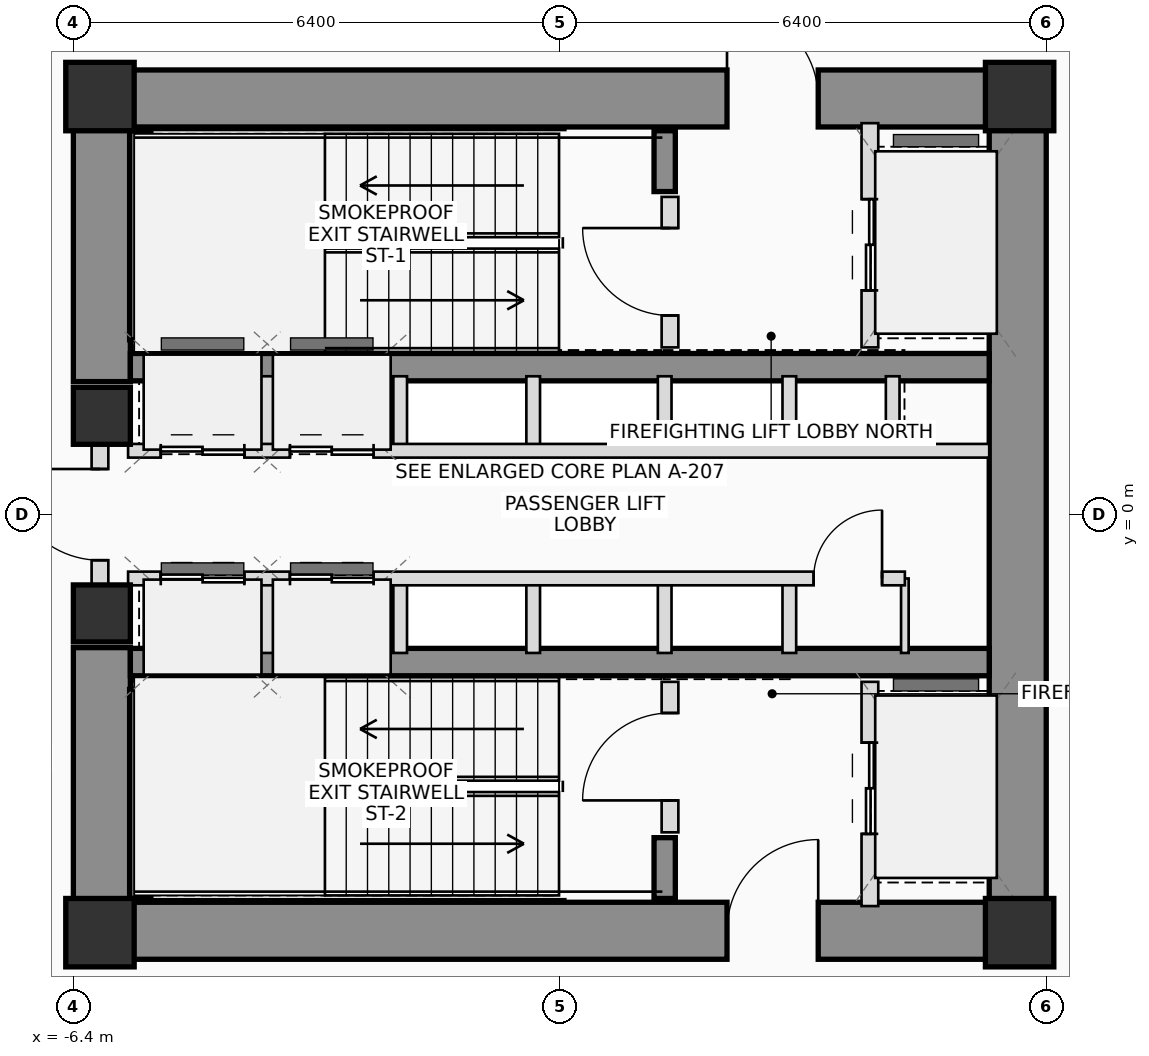
"""IFC4 building model, lengths in metres.
Left out: names, types, materials, properties, quantities, classifications, styles, units other than length and angle.
Written with IfcOpenShell. Run it as: python <this file> out.ifc"""

import sys

from ifc_helpers import new_model, si_unit, direction, frame, frame_2d, origin, origin_2d, place, context, subcontext, project, spatial, rectangle, extrude, source, transform, mapped, element, fill, save


model = new_model("IFC4")
c1 = context("Model", 3, precision=1e-05, world=origin(), true_north=direction((0.0, 1.0)))
c2 = subcontext(c1, "Body", "Model", "MODEL_VIEW")
j1 = project(units=[si_unit("LENGTHUNIT", "METRE"), si_unit("PLANEANGLEUNIT", "RADIAN")], contexts=[c1])
p1 = place(None, origin())
s1 = spatial("IfcSite", under=j1, at=p1, CompositionType="ELEMENT")
p2 = place(p1, origin())
s2 = spatial("IfcBuilding", under=s1, at=p2, CompositionType="ELEMENT")
p3 = place(p2, frame((0.0, 0.0, 66.05)))
s3 = spatial("IfcBuildingStorey", under=s2, at=p3, CompositionType="ELEMENT", Elevation=66.05)
m1 = source(origin(), c2, "Body", "SweptSolid", [
    extrude(rectangle(XDim=0.9, YDim=0.9, at=origin_2d()), origin(), (0.0, 0.0, 1.0), 3.75),
])
for number, where, z_axis, x_axis in (
    (1, (-6.05, -5.5, 0.0), (0.0, 0.0, 1.0), (1.0, 0.0, 0.0)),
    (2, (6.05, -5.5, 0.0), (0.0, 0.0, 1.0), (1.0, 0.0, 0.0)),
    (3, (6.05, 5.5, 0.0), (0.0, 0.0, 1.0), (1.0, 0.0, 0.0)),
    (4, (-6.05, 5.5, 0.0), (0.0, 0.0, 1.0), (1.0, 0.0, 0.0)),
):
    element("IfcColumn", number, at=place(p3, frame(where, z_axis=z_axis, x_axis=x_axis)), inside=s3, PredefinedType="COLUMN", context=c2, shape_type="MappedRepresentation", body=[
        mapped(m1, transform((0.0, 0.0, 0.0), scale=1.0)),
    ])
p4 = place(p3, frame((-6.4, 5.475, 0.0), z_axis=(0.0, 0.0, 1.0), x_axis=(1.0, 0.0, 0.0)))
e5 = element("IfcWall", 5, at=p4, inside=s3, PredefinedType="SHEAR", context=c2, shape_type="SweptSolid", body=[
    extrude(rectangle(XDim=12.8, YDim=0.75, at=frame_2d((6.4, 0.0))), origin(), (0.0, 0.0, 1.0), 3.75),
])
p5 = place(p4, frame((8.6, 0.0, 0.0)))
e6 = element("IfcOpeningElement", 6, at=p5, cuts=e5, PredefinedType="OPENING", context=c2, shape_type="SweptSolid", body=[
    extrude(rectangle(XDim=1.2, YDim=2.2, at=frame_2d((0.6, 1.1))), frame((0.0, 0.385, 0.0), z_axis=(0.0, -1.0, 0.0), x_axis=(1.0, 0.0, 0.0)), (0.0, 0.0, 1.0), 0.77),
])
p6 = place(p3, frame((-6.4, -5.475, 0.0), z_axis=(0.0, 0.0, 1.0), x_axis=(1.0, 0.0, 0.0)))
e7 = element("IfcWall", 7, at=p6, inside=s3, PredefinedType="SHEAR", context=c2, shape_type="SweptSolid", body=[
    extrude(rectangle(XDim=12.8, YDim=0.75, at=frame_2d((6.4, 0.0))), origin(), (0.0, 0.0, 1.0), 3.75),
])
p7 = place(p6, frame((8.6, 0.0, 0.0)))
e8 = element("IfcOpeningElement", 8, at=p7, cuts=e7, PredefinedType="OPENING", context=c2, shape_type="SweptSolid", body=[
    extrude(rectangle(XDim=1.2, YDim=2.2, at=frame_2d((0.6, 1.1))), frame((0.0, 0.385, 0.0), z_axis=(0.0, -1.0, 0.0), x_axis=(1.0, 0.0, 0.0)), (0.0, 0.0, 1.0), 0.77),
])
p8 = place(p3, frame((6.025, -5.1, 0.0), z_axis=(0.0, 0.0, 1.0), x_axis=(0.0, 1.0, 0.0)))
e9 = element("IfcWall", 9, at=p8, inside=s3, PredefinedType="SHEAR", context=c2, shape_type="SweptSolid", body=[
    extrude(rectangle(XDim=10.2, YDim=0.75, at=frame_2d((5.1, 0.0))), origin(), (0.0, 0.0, 1.0), 3.75),
])
for number, where, z_axis, x_axis in (
    (10, (-6.025, -5.1, 0.0), (0.0, 0.0, 1.0), (0.0, 1.0, 0.0)),
    (11, (-6.025, 1.75, 0.0), (0.0, 0.0, 1.0), (0.0, 1.0, 0.0)),
):
    element("IfcWall", number, at=place(p3, frame(where, z_axis=z_axis, x_axis=x_axis)), inside=s3, PredefinedType="SHEAR", context=c2, shape_type="SweptSolid", body=[
        extrude(rectangle(XDim=3.35, YDim=0.75, at=frame_2d((1.675, 0.0))), origin(), (0.0, 0.0, 1.0), 3.75),
    ])
for number, where, z_axis, x_axis in (
    (12, (-5.65, 1.94, 0.0), (0.0, 0.0, 1.0), (1.0, 0.0, 0.0)),
    (13, (-5.65, -1.94, 0.0), (0.0, 0.0, 1.0), (1.0, 0.0, 0.0)),
):
    element("IfcWall", number, at=place(p3, frame(where, z_axis=z_axis, x_axis=x_axis)), inside=s3, PredefinedType="SHEAR", context=c2, shape_type="SweptSolid", body=[
        extrude(rectangle(XDim=11.3, YDim=0.36, at=frame_2d((5.65, 0.0))), origin(), (0.0, 0.0, 1.0), 3.75),
    ])
p9 = place(p3, frame((-5.52, 2.3, 0.0), z_axis=(0.0, 0.0, 1.0), x_axis=(0.0, 1.0, 0.0)))
e14 = element("IfcWall", 14, at=p9, inside=s3, PredefinedType="SHEAR", context=c2, shape_type="SweptSolid", body=[
    extrude(rectangle(XDim=2.75, YDim=0.28, at=frame_2d((1.375, 0.0))), origin(), (0.0, 0.0, 1.0), 3.75),
])
p10 = place(p3, frame((1.38, 4.25, 0.0), z_axis=(0.0, 0.0, 1.0), x_axis=(0.0, 1.0, 0.0)))
e15 = element("IfcWall", 15, at=p10, inside=s3, PredefinedType="SHEAR", context=c2, shape_type="SweptSolid", body=[
    extrude(rectangle(XDim=0.8, YDim=0.28, at=frame_2d((0.4, 0.0))), origin(), (0.0, 0.0, 1.0), 3.75),
])
p11 = place(p3, frame((-5.52, -5.05, 0.0), z_axis=(0.0, 0.0, 1.0), x_axis=(0.0, 1.0, 0.0)))
e16 = element("IfcWall", 16, at=p11, inside=s3, PredefinedType="SHEAR", context=c2, shape_type="SweptSolid", body=[
    extrude(rectangle(XDim=2.75, YDim=0.28, at=frame_2d((1.375, 0.0))), origin(), (0.0, 0.0, 1.0), 3.75),
])
p12 = place(p3, frame((1.38, -5.05, 0.0), z_axis=(0.0, 0.0, 1.0), x_axis=(0.0, 1.0, 0.0)))
e17 = element("IfcWall", 17, at=p12, inside=s3, PredefinedType="SHEAR", context=c2, shape_type="SweptSolid", body=[
    extrude(rectangle(XDim=0.8, YDim=0.28, at=frame_2d((0.4, 0.0))), origin(), (0.0, 0.0, 1.0), 3.75),
])
m2 = source(origin(), c2, "Body", "SweptSolid", [
    extrude(rectangle(XDim=0.75, YDim=0.75, at=origin_2d()), origin(), (0.0, 0.0, 1.0), 3.75),
])
for number, where, z_axis, x_axis in (
    (18, (-6.025, -1.3, 0.0), (0.0, 0.0, 1.0), (1.0, 0.0, 0.0)),
    (19, (-6.025, 1.3, 0.0), (0.0, 0.0, 1.0), (1.0, 0.0, 0.0)),
):
    element("IfcColumn", number, at=place(p3, frame(where, z_axis=z_axis, x_axis=x_axis)), inside=s3, PredefinedType="COLUMN", context=c2, shape_type="MappedRepresentation", body=[
        mapped(m2, transform((0.0, 0.0, 0.0), scale=1.0)),
    ])
p13 = place(p3, frame((-6.05, -0.95, 0.0), z_axis=(0.0, 0.0, 1.0), x_axis=(0.0, 1.0, 0.0)))
e20 = element("IfcWall", 20, at=p13, inside=s3, PredefinedType="PLUMBINGWALL", context=c2, shape_type="SweptSolid", body=[
    extrude(rectangle(XDim=1.9, YDim=0.22, at=frame_2d((0.95, 0.0))), origin(), (0.0, 0.0, 1.0), 2.525),
])
p14 = place(p13, frame((0.35, 0.0, 0.0)))
e21 = element("IfcOpeningElement", 21, at=p14, cuts=e20, PredefinedType="OPENING", context=c2, shape_type="SweptSolid", body=[
    extrude(rectangle(XDim=1.2, YDim=2.2, at=frame_2d((0.6, 1.1))), frame((0.0, 0.12, 0.0), z_axis=(0.0, -1.0, 0.0), x_axis=(1.0, 0.0, 0.0)), (0.0, 0.0, 1.0), 0.24),
])
p15 = place(p3, frame((1.45, 2.2, 0.0), z_axis=(0.0, 0.0, 1.0), x_axis=(0.0, 1.0, 0.0)))
e22 = element("IfcWall", 22, at=p15, inside=s3, PredefinedType="PLUMBINGWALL", context=c2, shape_type="SweptSolid", body=[
    extrude(rectangle(XDim=1.98, YDim=0.22, at=frame_2d((0.99, 0.0))), origin(), (0.0, 0.0, 1.0), 3.545),
])
p16 = place(p15, frame((0.42, 0.0, 0.0)))
e23 = element("IfcOpeningElement", 23, at=p16, cuts=e22, PredefinedType="OPENING", context=c2, shape_type="SweptSolid", body=[
    extrude(rectangle(XDim=1.15, YDim=2.15, at=frame_2d((0.575, 1.075))), frame((0.0, 0.12, 0.0), z_axis=(0.0, -1.0, 0.0), x_axis=(1.0, 0.0, 0.0)), (0.0, 0.0, 1.0), 0.24),
])
p17 = place(p3, frame((4.08, 2.2, 0.0), z_axis=(0.0, 0.0, 1.0), x_axis=(0.0, 1.0, 0.0)))
e24 = element("IfcWall", 24, at=p17, inside=s3, PredefinedType="PLUMBINGWALL", context=c2, shape_type="SweptSolid", body=[
    extrude(rectangle(XDim=2.95, YDim=0.22, at=frame_2d((1.475, 0.0))), origin(), (0.0, 0.0, 1.0), 3.545),
])
p18 = place(p17, frame((0.75, 0.0, 0.0)))
e25 = element("IfcOpeningElement", 25, at=p18, cuts=e24, PredefinedType="OPENING", context=c2, shape_type="SweptSolid", body=[
    extrude(rectangle(XDim=1.2, YDim=2.25, at=frame_2d((0.6, 1.125))), frame((0.0, 0.12, 0.0), z_axis=(0.0, -1.0, 0.0), x_axis=(1.0, 0.0, 0.0)), (0.0, 0.0, 1.0), 0.24),
])
p19 = place(p3, frame((1.45, -4.18, 0.0), z_axis=(0.0, 0.0, 1.0), x_axis=(0.0, 1.0, 0.0)))
e26 = element("IfcWall", 26, at=p19, inside=s3, PredefinedType="PLUMBINGWALL", context=c2, shape_type="SweptSolid", body=[
    extrude(rectangle(XDim=1.98, YDim=0.22, at=frame_2d((0.99, 0.0))), origin(), (0.0, 0.0, 1.0), 3.545),
])
p20 = place(p19, frame((0.42, 0.0, 0.0)))
e27 = element("IfcOpeningElement", 27, at=p20, cuts=e26, PredefinedType="OPENING", context=c2, shape_type="SweptSolid", body=[
    extrude(rectangle(XDim=1.15, YDim=2.15, at=frame_2d((0.575, 1.075))), frame((0.0, 0.12, 0.0), z_axis=(0.0, -1.0, 0.0), x_axis=(1.0, 0.0, 0.0)), (0.0, 0.0, 1.0), 0.24),
])
p21 = place(p3, frame((4.08, -5.15, 0.0), z_axis=(0.0, 0.0, 1.0), x_axis=(0.0, 1.0, 0.0)))
e28 = element("IfcWall", 28, at=p21, inside=s3, PredefinedType="PLUMBINGWALL", context=c2, shape_type="SweptSolid", body=[
    extrude(rectangle(XDim=2.95, YDim=0.22, at=frame_2d((1.475, 0.0))), origin(), (0.0, 0.0, 1.0), 3.545),
])
p22 = place(p21, frame((0.95, 0.0, 0.0)))
e29 = element("IfcOpeningElement", 29, at=p22, cuts=e28, PredefinedType="OPENING", context=c2, shape_type="SweptSolid", body=[
    extrude(rectangle(XDim=1.2, YDim=2.25, at=frame_2d((0.6, 1.125))), frame((0.0, 0.12, 0.0), z_axis=(0.0, -1.0, 0.0), x_axis=(1.0, 0.0, 0.0)), (0.0, 0.0, 1.0), 0.24),
])
for number, where, z_axis, x_axis in (
    (30, (-3.85, 0.84, 0.0), (0.0, 0.0, 1.0), (0.0, 1.0, 0.0)),
    (31, (-3.85, -1.82, 0.0), (0.0, 0.0, 1.0), (0.0, 1.0, 0.0)),
    (32, (-2.1, 0.84, 0.0), (0.0, 0.0, 1.0), (0.0, 1.0, 0.0)),
    (33, (-2.1, -1.82, 0.0), (0.0, 0.0, 1.0), (0.0, 1.0, 0.0)),
    (34, (-0.35, 0.84, 0.0), (0.0, 0.0, 1.0), (0.0, 1.0, 0.0)),
    (35, (-0.35, -1.82, 0.0), (0.0, 0.0, 1.0), (0.0, 1.0, 0.0)),
    (36, (1.38, 0.84, 0.0), (0.0, 0.0, 1.0), (0.0, 1.0, 0.0)),
    (37, (1.38, -1.82, 0.0), (0.0, 0.0, 1.0), (0.0, 1.0, 0.0)),
    (38, (3.02, 0.84, 0.0), (0.0, 0.0, 1.0), (0.0, 1.0, 0.0)),
    (39, (4.38, 0.84, 0.0), (0.0, 0.0, 1.0), (0.0, 1.0, 0.0)),
    (40, (3.02, -1.82, 0.0), (0.0, 0.0, 1.0), (0.0, 1.0, 0.0)),
):
    element("IfcWall", number, at=place(p3, frame(where, z_axis=z_axis, x_axis=x_axis)), inside=s3, PredefinedType="PLUMBINGWALL", context=c2, shape_type="SweptSolid", body=[
        extrude(rectangle(XDim=0.98, YDim=0.18, at=frame_2d((0.49, 0.0))), origin(), (0.0, 0.0, 1.0), 3.545),
    ])
p23 = place(p3, frame((4.54, -1.82, 0.0), z_axis=(0.0, 0.0, 1.0), x_axis=(0.0, 1.0, 0.0)))
e41 = element("IfcWall", 41, at=p23, inside=s3, PredefinedType="PARTITIONING", context=c2, shape_type="SweptSolid", body=[
    extrude(rectangle(XDim=0.98, YDim=0.1, at=frame_2d((0.49, 0.0))), origin(), (0.0, 0.0, 1.0), 3.545),
])
p24 = place(p3, frame((-5.68, 0.84, 0.0), z_axis=(0.0, 0.0, 1.0), x_axis=(1.0, 0.0, 0.0)))
e42 = element("IfcWall", 42, at=p24, inside=s3, PredefinedType="PLUMBINGWALL", context=c2, shape_type="SweptSolid", body=[
    extrude(rectangle(XDim=11.33, YDim=0.18, at=frame_2d((5.665, 0.0))), origin(), (0.0, 0.0, 1.0), 3.545),
])
p25 = place(p24, frame((0.43, 0.0, 0.0)))
e43 = element("IfcOpeningElement", 43, at=p25, cuts=e42, PredefinedType="OPENING", context=c2, shape_type="SweptSolid", body=[
    extrude(rectangle(XDim=1.1, YDim=2.2, at=frame_2d((0.55, 1.1))), frame((0.0, 0.1, 0.0), z_axis=(0.0, -1.0, 0.0), x_axis=(1.0, 0.0, 0.0)), (0.0, 0.0, 1.0), 0.2),
])
p26 = place(p24, frame((2.13, 0.0, 0.0)))
e44 = element("IfcOpeningElement", 44, at=p26, cuts=e42, PredefinedType="OPENING", context=c2, shape_type="SweptSolid", body=[
    extrude(rectangle(XDim=1.1, YDim=2.2, at=frame_2d((0.55, 1.1))), frame((0.0, 0.1, 0.0), z_axis=(0.0, -1.0, 0.0), x_axis=(1.0, 0.0, 0.0)), (0.0, 0.0, 1.0), 0.2),
])
p27 = place(p3, frame((-5.68, -0.84, 0.0), z_axis=(0.0, 0.0, 1.0), x_axis=(1.0, 0.0, 0.0)))
e45 = element("IfcWall", 45, at=p27, inside=s3, PredefinedType="PLUMBINGWALL", context=c2, shape_type="SweptSolid", body=[
    extrude(rectangle(XDim=10.22, YDim=0.18, at=frame_2d((5.11, 0.0))), origin(), (0.0, 0.0, 1.0), 3.545),
])
p28 = place(p27, frame((0.43, 0.0, 0.0)))
e46 = element("IfcOpeningElement", 46, at=p28, cuts=e45, PredefinedType="OPENING", context=c2, shape_type="SweptSolid", body=[
    extrude(rectangle(XDim=1.1, YDim=2.2, at=frame_2d((0.55, 1.1))), frame((0.0, 0.1, 0.0), z_axis=(0.0, -1.0, 0.0), x_axis=(1.0, 0.0, 0.0)), (0.0, 0.0, 1.0), 0.2),
])
p29 = place(p27, frame((2.13, 0.0, 0.0)))
e47 = element("IfcOpeningElement", 47, at=p29, cuts=e45, PredefinedType="OPENING", context=c2, shape_type="SweptSolid", body=[
    extrude(rectangle(XDim=1.1, YDim=2.2, at=frame_2d((0.55, 1.1))), frame((0.0, 0.1, 0.0), z_axis=(0.0, -1.0, 0.0), x_axis=(1.0, 0.0, 0.0)), (0.0, 0.0, 1.0), 0.2),
])
p30 = place(p27, frame((9.02, 0.0, 0.0)))
e48 = element("IfcOpeningElement", 48, at=p30, cuts=e45, PredefinedType="OPENING", context=c2, shape_type="SweptSolid", body=[
    extrude(rectangle(XDim=0.9, YDim=2.05, at=frame_2d((0.45, 1.025))), frame((0.0, 0.1, 0.0), z_axis=(0.0, -1.0, 0.0), x_axis=(1.0, 0.0, 0.0)), (0.0, 0.0, 1.0), 0.2),
])
p31 = place(p5, origin())
e49 = element("IfcDoor", 49, at=p31, inside=s3, OperationType="SINGLE_SWING_LEFT", PredefinedType="DOOR", context=c2, shape_type="SweptSolid", body=[
    extrude(rectangle(XDim=1.2, YDim=2.2, at=frame_2d((0.6, 1.1))), frame((0.0, 0.025, 0.0), z_axis=(0.0, -1.0, 0.0), x_axis=(1.0, 0.0, 0.0)), (0.0, 0.0, 1.0), 0.05),
])
fill(e6, e49)
p32 = place(p7, origin())
e50 = element("IfcDoor", 50, at=p32, inside=s3, OperationType="SINGLE_SWING_RIGHT", PredefinedType="DOOR", context=c2, shape_type="SweptSolid", body=[
    extrude(rectangle(XDim=1.2, YDim=2.2, at=frame_2d((0.6, 1.1))), frame((0.0, 0.025, 0.0), z_axis=(0.0, -1.0, 0.0), x_axis=(1.0, 0.0, 0.0)), (0.0, 0.0, 1.0), 0.05),
])
fill(e8, e50)
p33 = place(p14, origin())
e51 = element("IfcDoor", 51, at=p33, inside=s3, OperationType="SINGLE_SWING_RIGHT", PredefinedType="DOOR", context=c2, shape_type="SweptSolid", body=[
    extrude(rectangle(XDim=1.2, YDim=2.2, at=frame_2d((0.6, 1.1))), frame((0.0, 0.025, 0.0), z_axis=(0.0, -1.0, 0.0), x_axis=(1.0, 0.0, 0.0)), (0.0, 0.0, 1.0), 0.05),
])
fill(e21, e51)
p34 = place(p16, origin())
e52 = element("IfcDoor", 52, at=p34, inside=s3, OperationType="SINGLE_SWING_RIGHT", PredefinedType="DOOR", context=c2, shape_type="SweptSolid", body=[
    extrude(rectangle(XDim=1.15, YDim=2.15, at=frame_2d((0.575, 1.075))), frame((0.0, 0.025, 0.0), z_axis=(0.0, -1.0, 0.0), x_axis=(1.0, 0.0, 0.0)), (0.0, 0.0, 1.0), 0.05),
])
fill(e23, e52)
p35 = place(p18, origin())
e53 = element("IfcDoor", 53, at=p35, inside=s3, OperationType="DOUBLE_DOOR_SLIDING", PredefinedType="DOOR", context=c2, shape_type="SweptSolid", body=[
    extrude(rectangle(XDim=1.2, YDim=2.25, at=frame_2d((0.6, 1.125))), frame((0.0, 0.025, 0.0), z_axis=(0.0, -1.0, 0.0), x_axis=(1.0, 0.0, 0.0)), (0.0, 0.0, 1.0), 0.05),
])
fill(e25, e53)
p36 = place(p20, origin())
e54 = element("IfcDoor", 54, at=p36, inside=s3, OperationType="SINGLE_SWING_LEFT", PredefinedType="DOOR", context=c2, shape_type="SweptSolid", body=[
    extrude(rectangle(XDim=1.15, YDim=2.15, at=frame_2d((0.575, 1.075))), frame((0.0, 0.025, 0.0), z_axis=(0.0, -1.0, 0.0), x_axis=(1.0, 0.0, 0.0)), (0.0, 0.0, 1.0), 0.05),
])
fill(e27, e54)
p37 = place(p22, origin())
e55 = element("IfcDoor", 55, at=p37, inside=s3, OperationType="DOUBLE_DOOR_SLIDING", PredefinedType="DOOR", context=c2, shape_type="SweptSolid", body=[
    extrude(rectangle(XDim=1.2, YDim=2.25, at=frame_2d((0.6, 1.125))), frame((0.0, 0.025, 0.0), z_axis=(0.0, -1.0, 0.0), x_axis=(1.0, 0.0, 0.0)), (0.0, 0.0, 1.0), 0.05),
])
fill(e29, e55)
p38 = place(p25, origin())
e56 = element("IfcDoor", 56, at=p38, inside=s3, OperationType="DOUBLE_DOOR_SLIDING", PredefinedType="DOOR", context=c2, shape_type="SweptSolid", body=[
    extrude(rectangle(XDim=1.1, YDim=2.2, at=frame_2d((0.55, 1.1))), frame((0.0, 0.025, 0.0), z_axis=(0.0, -1.0, 0.0), x_axis=(1.0, 0.0, 0.0)), (0.0, 0.0, 1.0), 0.05),
])
fill(e43, e56)
p39 = place(p26, origin())
e57 = element("IfcDoor", 57, at=p39, inside=s3, OperationType="DOUBLE_DOOR_SLIDING", PredefinedType="DOOR", context=c2, shape_type="SweptSolid", body=[
    extrude(rectangle(XDim=1.1, YDim=2.2, at=frame_2d((0.55, 1.1))), frame((0.0, 0.025, 0.0), z_axis=(0.0, -1.0, 0.0), x_axis=(1.0, 0.0, 0.0)), (0.0, 0.0, 1.0), 0.05),
])
fill(e44, e57)
p40 = place(p28, origin())
e58 = element("IfcDoor", 58, at=p40, inside=s3, OperationType="DOUBLE_DOOR_SLIDING", PredefinedType="DOOR", context=c2, shape_type="SweptSolid", body=[
    extrude(rectangle(XDim=1.1, YDim=2.2, at=frame_2d((0.55, 1.1))), frame((0.0, 0.025, 0.0), z_axis=(0.0, -1.0, 0.0), x_axis=(1.0, 0.0, 0.0)), (0.0, 0.0, 1.0), 0.05),
])
fill(e46, e58)
p41 = place(p29, origin())
e59 = element("IfcDoor", 59, at=p41, inside=s3, OperationType="DOUBLE_DOOR_SLIDING", PredefinedType="DOOR", context=c2, shape_type="SweptSolid", body=[
    extrude(rectangle(XDim=1.1, YDim=2.2, at=frame_2d((0.55, 1.1))), frame((0.0, 0.025, 0.0), z_axis=(0.0, -1.0, 0.0), x_axis=(1.0, 0.0, 0.0)), (0.0, 0.0, 1.0), 0.05),
])
fill(e47, e59)
p42 = place(p30, origin())
e60 = element("IfcDoor", 60, at=p42, inside=s3, OperationType="SINGLE_SWING_RIGHT", PredefinedType="DOOR", context=c2, shape_type="SweptSolid", body=[
    extrude(rectangle(XDim=0.9, YDim=2.05, at=frame_2d((0.45, 1.025))), frame((0.0, 0.025, 0.0), z_axis=(0.0, -1.0, 0.0), x_axis=(1.0, 0.0, 0.0)), (0.0, 0.0, 1.0), 0.05),
])
fill(e48, e60)
save(model, sys.argv[1])
